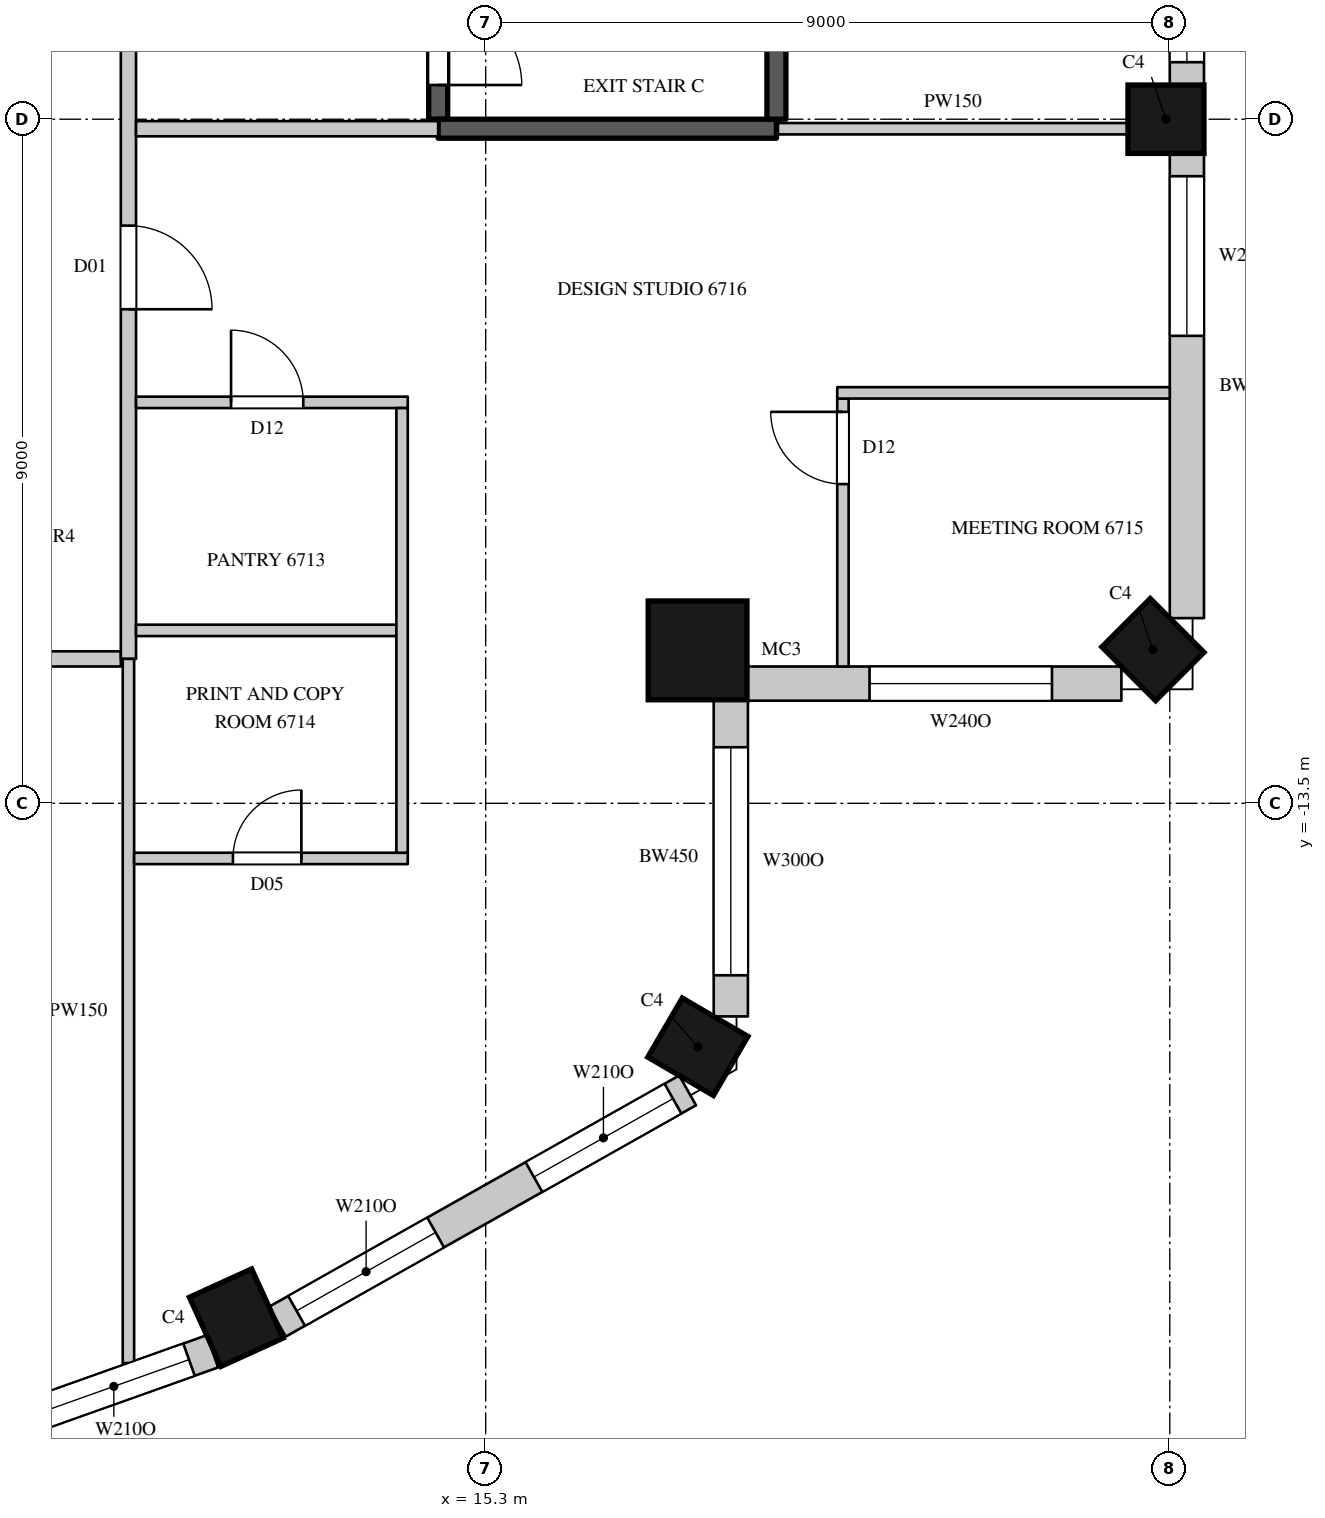
"""IFC4 building model, lengths in metres.
Left out: names, types, materials, properties, quantities, classifications, styles, units other than length and angle.
Written with IfcOpenShell. Run it as: python <this file> out.ifc"""

import sys

from ifc_helpers import new_model, si_unit, direction, frame, frame_2d, origin, origin_2d, place, context, subcontext, project, spatial, rectangle, circle, extrude, element, fill, save


model = new_model("IFC4")
c1 = context("Model", 3, precision=1e-05, world=origin(), true_north=direction((0.0, 1.0)))
c2 = subcontext(c1, "Body", "Model", "MODEL_VIEW")
j1 = project(units=[si_unit("LENGTHUNIT", "METRE"), si_unit("PLANEANGLEUNIT", "RADIAN")], contexts=[c1])
p1 = place(None, origin())
s1 = spatial("IfcSite", under=j1, at=p1, CompositionType="ELEMENT")
p2 = place(p1, origin())
s2 = spatial("IfcBuilding", under=s1, at=p2, CompositionType="ELEMENT")
p3 = place(p2, frame((0.0, 0.0, 296.7)))
s3 = spatial("IfcBuildingStorey", under=s2, at=p3, CompositionType="ELEMENT", Elevation=296.7)
for number, where, z_axis, x_axis in (
    (1, (12.019, -20.267, 0.0), (0.0, 0.0, 1.0), (0.91, 0.415, 0.0)),
    (2, (18.091, -16.703, 0.0), (0.0, 0.0, 1.0), (0.504, 0.863, 0.0)),
):
    element("IfcColumn", number, at=place(p3, frame(where, z_axis=z_axis, x_axis=x_axis)), inside=s3, PredefinedType="COLUMN", context=c2, shape_type="SweptSolid", body=[
        extrude(rectangle(XDim=0.9, YDim=1.0, at=origin_2d()), origin(), (0.0, 0.0, 1.0), 4.1),
    ])
p4 = place(p3, frame((18.088, -11.488, 0.0), z_axis=(0.0, 0.0, 1.0), x_axis=(1.0, 0.0, 0.0)))
e3 = element("IfcColumn", 3, at=p4, inside=s3, PredefinedType="COLUMN", context=c2, shape_type="SweptSolid", body=[
    extrude(circle(Radius=0.65, at=origin_2d()), origin(), (0.0, 0.0, 1.0), 4.1),
])
for number, where, z_axis, x_axis in (
    (4, (24.078, -11.478, 0.0), (0.0, 0.0, 1.0), (0.707, 0.707, 0.0)),
    (5, (24.25, -4.5, 0.0), (0.0, 0.0, 1.0), (0.0, 1.0, 0.0)),
):
    element("IfcColumn", number, at=place(p3, frame(where, z_axis=z_axis, x_axis=x_axis)), inside=s3, PredefinedType="COLUMN", context=c2, shape_type="SweptSolid", body=[
        extrude(rectangle(XDim=0.9, YDim=1.0, at=origin_2d()), origin(), (0.0, 0.0, 1.0), 4.1),
    ])
p5 = place(p3, frame((5.665, -22.859, 0.0), z_axis=(0.0, 0.0, 1.0), x_axis=(0.942108340262, 0.335308626803, 0.0)))
e6 = element("IfcWall", 6, at=p5, inside=s3, PredefinedType="SOLIDWALL", context=c2, shape_type="SweptSolid", body=[
    extrude(rectangle(XDim=6.412, YDim=0.45, at=frame_2d((3.206, 0.0))), origin(), (0.0, 0.0, 1.0), 3.8),
])
p6 = place(p5, frame((0.327, 0.0, 1.05)))
e7 = element("IfcOpeningElement", 7, at=p6, cuts=e6, PredefinedType="OPENING", context=c2, shape_type="SweptSolid", body=[
    extrude(rectangle(XDim=2.1, YDim=2.4, at=frame_2d((1.05, 1.2))), frame((0.0, 0.235, 0.0), z_axis=(0.0, -1.0, 0.0), x_axis=(1.0, 0.0, 0.0)), (0.0, 0.0, 1.0), 0.47),
])
p7 = place(p5, frame((3.985, 0.0, 1.05)))
e8 = element("IfcOpeningElement", 8, at=p7, cuts=e6, PredefinedType="OPENING", context=c2, shape_type="SweptSolid", body=[
    extrude(rectangle(XDim=2.1, YDim=2.4, at=frame_2d((1.05, 1.2))), frame((0.0, 0.235, 0.0), z_axis=(0.0, -1.0, 0.0), x_axis=(1.0, 0.0, 0.0)), (0.0, 0.0, 1.0), 0.47),
])
p8 = place(p3, frame((12.559, -20.32, 0.0), z_axis=(0.0, 0.0, 1.0), x_axis=(0.871065783524, 0.491166367714, 0.0)))
e9 = element("IfcWall", 9, at=p8, inside=s3, PredefinedType="SOLIDWALL", context=c2, shape_type="SweptSolid", body=[
    extrude(rectangle(XDim=6.196, YDim=0.45, at=frame_2d((3.098, 0.0))), origin(), (0.0, 0.0, 1.0), 3.8),
])
p9 = place(p8, frame((0.291, 0.0, 1.05)))
e10 = element("IfcOpeningElement", 10, at=p9, cuts=e9, PredefinedType="OPENING", context=c2, shape_type="SweptSolid", body=[
    extrude(rectangle(XDim=2.1, YDim=2.4, at=frame_2d((1.05, 1.2))), frame((0.0, 0.235, 0.0), z_axis=(0.0, -1.0, 0.0), x_axis=(1.0, 0.0, 0.0)), (0.0, 0.0, 1.0), 0.47),
])
p10 = place(p8, frame((3.875, 0.0, 1.05)))
e11 = element("IfcOpeningElement", 11, at=p10, cuts=e9, PredefinedType="OPENING", context=c2, shape_type="SweptSolid", body=[
    extrude(rectangle(XDim=2.1, YDim=2.4, at=frame_2d((1.05, 1.2))), frame((0.0, 0.235, 0.0), z_axis=(0.0, -1.0, 0.0), x_axis=(1.0, 0.0, 0.0)), (0.0, 0.0, 1.0), 0.47),
])
p11 = place(p3, frame((18.525, -16.304, 0.0), z_axis=(0.0, 0.0, 1.0), x_axis=(0.0, 1.0, 0.0)))
e12 = element("IfcWall", 12, at=p11, inside=s3, PredefinedType="SOLIDWALL", context=c2, shape_type="SweptSolid", body=[
    extrude(rectangle(XDim=4.202, YDim=0.45, at=frame_2d((2.101, 0.0))), origin(), (0.0, 0.0, 1.0), 3.8),
])
p12 = place(p11, frame((0.541, 0.0, 1.05)))
e13 = element("IfcOpeningElement", 13, at=p12, cuts=e12, PredefinedType="OPENING", context=c2, shape_type="SweptSolid", body=[
    extrude(rectangle(XDim=3.0, YDim=2.4, at=frame_2d((1.5, 1.2))), frame((0.0, 0.235, 0.0), z_axis=(0.0, -1.0, 0.0), x_axis=(1.0, 0.0, 0.0)), (0.0, 0.0, 1.0), 0.47),
])
p13 = place(p3, frame((18.701, -11.925, 0.0), z_axis=(0.0, 0.0, 1.0), x_axis=(1.0, 0.0, 0.0)))
e14 = element("IfcWall", 14, at=p13, inside=s3, PredefinedType="SOLIDWALL", context=c2, shape_type="SweptSolid", body=[
    extrude(rectangle(XDim=4.962, YDim=0.45, at=frame_2d((2.481, 0.0))), origin(), (0.0, 0.0, 1.0), 3.8),
])
p14 = place(p13, frame((1.648, 0.0, 1.05)))
e15 = element("IfcOpeningElement", 15, at=p14, cuts=e14, PredefinedType="OPENING", context=c2, shape_type="SweptSolid", body=[
    extrude(rectangle(XDim=2.4, YDim=2.4, at=frame_2d((1.2, 1.2))), frame((0.0, 0.235, 0.0), z_axis=(0.0, -1.0, 0.0), x_axis=(1.0, 0.0, 0.0)), (0.0, 0.0, 1.0), 0.47),
])
p15 = place(p3, frame((24.525, -11.064, 0.0), z_axis=(0.0, 0.0, 1.0), x_axis=(0.0, 1.0, 0.0)))
e16 = element("IfcWall", 16, at=p15, inside=s3, PredefinedType="SOLIDWALL", context=c2, shape_type="SweptSolid", body=[
    extrude(rectangle(XDim=6.114, YDim=0.45, at=frame_2d((3.057, 0.0))), origin(), (0.0, 0.0, 1.0), 3.8),
])
p16 = place(p15, frame((3.714, 0.0, 1.05)))
e17 = element("IfcOpeningElement", 17, at=p16, cuts=e16, PredefinedType="OPENING", context=c2, shape_type="SweptSolid", body=[
    extrude(rectangle(XDim=2.1, YDim=2.4, at=frame_2d((1.05, 1.2))), frame((0.0, 0.235, 0.0), z_axis=(0.0, -1.0, 0.0), x_axis=(1.0, 0.0, 0.0)), (0.0, 0.0, 1.0), 0.47),
])
p17 = place(p3, frame((24.525, -4.05, 0.0), z_axis=(0.0, 0.0, 1.0), x_axis=(0.0, 1.0, 0.0)))
e18 = element("IfcWall", 18, at=p17, inside=s3, PredefinedType="SOLIDWALL", context=c2, shape_type="SweptSolid", body=[
    extrude(rectangle(XDim=8.1, YDim=0.45, at=frame_2d((4.05, 0.0))), origin(), (0.0, 0.0, 1.0), 3.8),
])
p18 = place(p17, frame((0.3, 0.0, 1.05)))
e19 = element("IfcOpeningElement", 19, at=p18, cuts=e18, PredefinedType="OPENING", context=c2, shape_type="SweptSolid", body=[
    extrude(rectangle(XDim=3.0, YDim=2.4, at=frame_2d((1.5, 1.2))), frame((0.0, 0.235, 0.0), z_axis=(0.0, -1.0, 0.0), x_axis=(1.0, 0.0, 0.0)), (0.0, 0.0, 1.0), 0.47),
])
p19 = place(p17, frame((4.8, 0.0, 1.05)))
e20 = element("IfcOpeningElement", 20, at=p19, cuts=e18, PredefinedType="OPENING", context=c2, shape_type="SweptSolid", body=[
    extrude(rectangle(XDim=3.0, YDim=2.4, at=frame_2d((1.5, 1.2))), frame((0.0, 0.235, 0.0), z_axis=(0.0, -1.0, 0.0), x_axis=(1.0, 0.0, 0.0)), (0.0, 0.0, 1.0), 0.47),
])
p20 = place(p3, frame((7.021, -11.6, 0.0), z_axis=(0.0, 0.0, 1.0), x_axis=(1.0, 0.0, 0.0)))
e21 = element("IfcWall", 21, at=p20, inside=s3, PredefinedType="PARTITIONING", context=c2, shape_type="SweptSolid", body=[
    extrude(rectangle(XDim=3.479, YDim=0.2, at=frame_2d((1.74, 0.0))), origin(), (0.0, 0.0, 1.0), 3.8),
])
p21 = place(p3, frame((10.6, -11.6, 0.0), z_axis=(0.0, 0.0, 1.0), x_axis=(0.0, 1.0, 0.0)))
e22 = element("IfcWall", 22, at=p21, inside=s3, PredefinedType="PARTITIONING", context=c2, shape_type="SweptSolid", body=[
    extrude(rectangle(XDim=23.7, YDim=0.2, at=frame_2d((11.85, 0.0))), origin(), (0.0, 0.0, 1.0), 3.8),
])
p22 = place(p21, frame((9.45, 0.0, 0.0)))
e23 = element("IfcOpeningElement", 23, at=p22, cuts=e22, PredefinedType="OPENING", context=c2, shape_type="SweptSolid", body=[
    extrude(rectangle(XDim=1.5, YDim=2.4, at=frame_2d((0.75, 1.2))), frame((0.0, 0.11, 0.0), z_axis=(0.0, -1.0, 0.0), x_axis=(1.0, 0.0, 0.0)), (0.0, 0.0, 1.0), 0.22),
])
p23 = place(p21, frame((19.45, 0.0, 0.0)))
e24 = element("IfcOpeningElement", 24, at=p23, cuts=e22, PredefinedType="OPENING", context=c2, shape_type="SweptSolid", body=[
    extrude(rectangle(XDim=1.1, YDim=2.4, at=frame_2d((0.55, 1.2))), frame((0.0, 0.11, 0.0), z_axis=(0.0, -1.0, 0.0), x_axis=(1.0, 0.0, 0.0)), (0.0, 0.0, 1.0), 0.22),
])
p24 = place(p21, frame((4.6, 0.0, 0.0)))
e25 = element("IfcOpeningElement", 25, at=p24, cuts=e22, PredefinedType="OPENING", context=c2, shape_type="SweptSolid", body=[
    extrude(rectangle(XDim=1.1, YDim=2.4, at=frame_2d((0.55, 1.2))), frame((0.0, 0.11, 0.0), z_axis=(0.0, -1.0, 0.0), x_axis=(1.0, 0.0, 0.0)), (0.0, 0.0, 1.0), 0.22),
])
p25 = place(p3, frame((10.7, -4.625, 0.0), z_axis=(0.0, 0.0, 1.0), x_axis=(1.0, 0.0, 0.0)))
e26 = element("IfcWall", 26, at=p25, inside=s3, PredefinedType="PARTITIONING", context=c2, shape_type="SweptSolid", body=[
    extrude(rectangle(XDim=3.975, YDim=0.2, at=frame_2d((1.988, 0.0))), origin(), (0.0, 0.0, 1.0), 3.8),
])
p26 = place(p3, frame((10.6, -20.864, 0.0), z_axis=(0.0, 0.0, 1.0), x_axis=(0.0, 1.0, 0.0)))
e27 = element("IfcWall", 27, at=p26, inside=s3, PredefinedType="PARTITIONING", context=c2, shape_type="SweptSolid", body=[
    extrude(rectangle(XDim=9.264, YDim=0.15, at=frame_2d((4.632, 0.0))), origin(), (0.0, 0.0, 1.0), 3.8),
])
p27 = place(p3, frame((10.675, -14.225, 0.0), z_axis=(0.0, 0.0, 1.0), x_axis=(1.0, 0.0, 0.0)))
e28 = element("IfcWall", 28, at=p27, inside=s3, PredefinedType="PARTITIONING", context=c2, shape_type="SweptSolid", body=[
    extrude(rectangle(XDim=3.6, YDim=0.15, at=frame_2d((1.8, 0.0))), origin(), (0.0, 0.0, 1.0), 3.8),
])
p28 = place(p27, frame((1.3, 0.0, 0.0)))
e29 = element("IfcOpeningElement", 29, at=p28, cuts=e28, PredefinedType="OPENING", context=c2, shape_type="SweptSolid", body=[
    extrude(rectangle(XDim=0.9, YDim=2.2, at=frame_2d((0.45, 1.1))), frame((0.0, 0.085, 0.0), z_axis=(0.0, -1.0, 0.0), x_axis=(1.0, 0.0, 0.0)), (0.0, 0.0, 1.0), 0.17),
])
p29 = place(p3, frame((10.7, -11.225, 0.0), z_axis=(0.0, 0.0, 1.0), x_axis=(1.0, 0.0, 0.0)))
e30 = element("IfcWall", 30, at=p29, inside=s3, PredefinedType="PARTITIONING", context=c2, shape_type="SweptSolid", body=[
    extrude(rectangle(XDim=3.425, YDim=0.15, at=frame_2d((1.712, 0.0))), origin(), (0.0, 0.0, 1.0), 3.8),
])
p30 = place(p3, frame((10.7, -8.225, 0.0), z_axis=(0.0, 0.0, 1.0), x_axis=(1.0, 0.0, 0.0)))
e31 = element("IfcWall", 31, at=p30, inside=s3, PredefinedType="PARTITIONING", context=c2, shape_type="SweptSolid", body=[
    extrude(rectangle(XDim=3.575, YDim=0.15, at=frame_2d((1.788, 0.0))), origin(), (0.0, 0.0, 1.0), 3.15),
])
p31 = place(p30, frame((1.25, 0.0, 0.0)))
e32 = element("IfcOpeningElement", 32, at=p31, cuts=e31, PredefinedType="OPENING", context=c2, shape_type="SweptSolid", body=[
    extrude(rectangle(XDim=0.95, YDim=2.2, at=frame_2d((0.475, 1.1))), frame((0.0, 0.085, 0.0), z_axis=(0.0, -1.0, 0.0), x_axis=(1.0, 0.0, 0.0)), (0.0, 0.0, 1.0), 0.17),
])
p32 = place(p3, frame((14.2, -14.15, 0.0), z_axis=(0.0, 0.0, 1.0), x_axis=(0.0, 1.0, 0.0)))
e33 = element("IfcWall", 33, at=p32, inside=s3, PredefinedType="PARTITIONING", context=c2, shape_type="SweptSolid", body=[
    extrude(rectangle(XDim=5.85, YDim=0.15, at=frame_2d((2.925, 0.0))), origin(), (0.0, 0.0, 1.0), 3.8),
])
p33 = place(p3, frame((19.145, -4.625, 0.0), z_axis=(0.0, 0.0, 1.0), x_axis=(1.0, 0.0, 0.0)))
e34 = element("IfcWall", 34, at=p33, inside=s3, PredefinedType="PARTITIONING", context=c2, shape_type="SweptSolid", body=[
    extrude(rectangle(XDim=4.605, YDim=0.15, at=frame_2d((2.302, 0.0))), origin(), (0.0, 0.0, 1.0), 3.8),
])
p34 = place(p3, frame((20.0, -11.7, 0.0), z_axis=(0.0, 0.0, 1.0), x_axis=(0.0, 1.0, 0.0)))
e35 = element("IfcWall", 35, at=p34, inside=s3, PredefinedType="PARTITIONING", context=c2, shape_type="SweptSolid", body=[
    extrude(rectangle(XDim=3.525, YDim=0.15, at=frame_2d((1.762, 0.0))), origin(), (0.0, 0.0, 1.0), 3.8),
])
p35 = place(p34, frame((2.4, 0.0, 0.0)))
e36 = element("IfcOpeningElement", 36, at=p35, cuts=e35, PredefinedType="OPENING", context=c2, shape_type="SweptSolid", body=[
    extrude(rectangle(XDim=0.95, YDim=2.2, at=frame_2d((0.475, 1.1))), frame((0.0, 0.085, 0.0), z_axis=(0.0, -1.0, 0.0), x_axis=(1.0, 0.0, 0.0)), (0.0, 0.0, 1.0), 0.17),
])
p36 = place(p3, frame((19.925, -8.1, 0.0), z_axis=(0.0, 0.0, 1.0), x_axis=(1.0, 0.0, 0.0)))
e37 = element("IfcWall", 37, at=p36, inside=s3, PredefinedType="PARTITIONING", context=c2, shape_type="SweptSolid", body=[
    extrude(rectangle(XDim=4.375, YDim=0.15, at=frame_2d((2.188, 0.0))), origin(), (0.0, 0.0, 1.0), 3.15),
])
p37 = place(p3, frame((14.675, -4.5, 0.0), z_axis=(0.0, 0.0, 1.0), x_axis=(0.0, 1.0, 0.0)))
e38 = element("IfcWall", 38, at=p37, inside=s3, PredefinedType="SHEAR", context=c2, shape_type="SweptSolid", body=[
    extrude(rectangle(XDim=9.0, YDim=0.25, at=frame_2d((4.5, 0.0))), origin(), (0.0, 0.0, 1.0), 3.8),
])
p38 = place(p37, frame((0.45, 0.0, 0.0)))
e39 = element("IfcOpeningElement", 39, at=p38, cuts=e38, PredefinedType="OPENING", context=c2, shape_type="SweptSolid", body=[
    extrude(rectangle(XDim=1.1, YDim=2.2, at=frame_2d((0.55, 1.1))), frame((0.0, 0.135, 0.0), z_axis=(0.0, -1.0, 0.0), x_axis=(1.0, 0.0, 0.0)), (0.0, 0.0, 1.0), 0.27),
])
p39 = place(p3, frame((14.675, -4.625, 0.0), z_axis=(0.0, 0.0, 1.0), x_axis=(1.0, 0.0, 0.0)))
e40 = element("IfcWall", 40, at=p39, inside=s3, PredefinedType="SHEAR", context=c2, shape_type="SweptSolid", body=[
    extrude(rectangle(XDim=4.45, YDim=0.25, at=frame_2d((2.225, 0.0))), origin(), (0.0, 0.0, 1.0), 3.8),
])
p40 = place(p3, frame((19.125, -4.5, 0.0), z_axis=(0.0, 0.0, 1.0), x_axis=(0.0, 1.0, 0.0)))
e41 = element("IfcWall", 41, at=p40, inside=s3, PredefinedType="SHEAR", context=c2, shape_type="SweptSolid", body=[
    extrude(rectangle(XDim=9.0, YDim=0.25, at=frame_2d((4.5, 0.0))), origin(), (0.0, 0.0, 1.0), 3.8),
])
p41 = place(p7, origin())
e42 = element("IfcWindow", 42, at=p41, inside=s3, PartitioningType="SINGLE_PANEL", PredefinedType="WINDOW", context=c2, shape_type="SweptSolid", body=[
    extrude(rectangle(XDim=2.1, YDim=2.4, at=frame_2d((1.05, 1.2))), frame((0.0, 0.135, 0.0), z_axis=(0.0, -1.0, 0.0), x_axis=(1.0, 0.0, 0.0)), (0.0, 0.0, 1.0), 0.06),
])
fill(e8, e42)
p42 = place(p9, origin())
e43 = element("IfcWindow", 43, at=p42, inside=s3, PartitioningType="SINGLE_PANEL", PredefinedType="WINDOW", context=c2, shape_type="SweptSolid", body=[
    extrude(rectangle(XDim=2.1, YDim=2.4, at=frame_2d((1.05, 1.2))), frame((0.0, 0.135, 0.0), z_axis=(0.0, -1.0, 0.0), x_axis=(1.0, 0.0, 0.0)), (0.0, 0.0, 1.0), 0.06),
])
fill(e10, e43)
p43 = place(p10, origin())
e44 = element("IfcWindow", 44, at=p43, inside=s3, PartitioningType="SINGLE_PANEL", PredefinedType="WINDOW", context=c2, shape_type="SweptSolid", body=[
    extrude(rectangle(XDim=2.1, YDim=2.4, at=frame_2d((1.05, 1.2))), frame((0.0, 0.135, 0.0), z_axis=(0.0, -1.0, 0.0), x_axis=(1.0, 0.0, 0.0)), (0.0, 0.0, 1.0), 0.06),
])
fill(e11, e44)
p44 = place(p12, origin())
e45 = element("IfcWindow", 45, at=p44, inside=s3, PartitioningType="SINGLE_PANEL", PredefinedType="WINDOW", context=c2, shape_type="SweptSolid", body=[
    extrude(rectangle(XDim=3.0, YDim=2.4, at=frame_2d((1.5, 1.2))), frame((0.0, 0.135, 0.0), z_axis=(0.0, -1.0, 0.0), x_axis=(1.0, 0.0, 0.0)), (0.0, 0.0, 1.0), 0.06),
])
fill(e13, e45)
p45 = place(p16, origin())
e46 = element("IfcWindow", 46, at=p45, inside=s3, PartitioningType="SINGLE_PANEL", PredefinedType="WINDOW", context=c2, shape_type="SweptSolid", body=[
    extrude(rectangle(XDim=2.1, YDim=2.4, at=frame_2d((1.05, 1.2))), frame((0.0, 0.135, 0.0), z_axis=(0.0, -1.0, 0.0), x_axis=(1.0, 0.0, 0.0)), (0.0, 0.0, 1.0), 0.06),
])
fill(e17, e46)
p46 = place(p18, origin())
e47 = element("IfcWindow", 47, at=p46, inside=s3, PartitioningType="SINGLE_PANEL", PredefinedType="WINDOW", context=c2, shape_type="SweptSolid", body=[
    extrude(rectangle(XDim=3.0, YDim=2.4, at=frame_2d((1.5, 1.2))), frame((0.0, 0.135, 0.0), z_axis=(0.0, -1.0, 0.0), x_axis=(1.0, 0.0, 0.0)), (0.0, 0.0, 1.0), 0.06),
])
fill(e19, e47)
p47 = place(p24, origin())
e48 = element("IfcDoor", 48, at=p47, inside=s3, OperationType="SINGLE_SWING_RIGHT", PredefinedType="DOOR", context=c2, shape_type="SweptSolid", body=[
    extrude(rectangle(XDim=1.1, YDim=2.4, at=frame_2d((0.55, 1.2))), frame((0.0, 0.025, 0.0), z_axis=(0.0, -1.0, 0.0), x_axis=(1.0, 0.0, 0.0)), (0.0, 0.0, 1.0), 0.05),
])
fill(e25, e48)
p48 = place(p31, origin())
e49 = element("IfcDoor", 49, at=p48, inside=s3, OperationType="SINGLE_SWING_LEFT", PredefinedType="DOOR", context=c2, shape_type="SweptSolid", body=[
    extrude(rectangle(XDim=0.95, YDim=2.2, at=frame_2d((0.475, 1.1))), frame((0.0, 0.025, 0.0), z_axis=(0.0, -1.0, 0.0), x_axis=(1.0, 0.0, 0.0)), (0.0, 0.0, 1.0), 0.05),
])
fill(e32, e49)
p49 = place(p28, origin())
e50 = element("IfcDoor", 50, at=p49, inside=s3, OperationType="SINGLE_SWING_RIGHT", PredefinedType="DOOR", context=c2, shape_type="SweptSolid", body=[
    extrude(rectangle(XDim=0.9, YDim=2.2, at=frame_2d((0.45, 1.1))), frame((0.0, 0.025, 0.0), z_axis=(0.0, -1.0, 0.0), x_axis=(1.0, 0.0, 0.0)), (0.0, 0.0, 1.0), 0.05),
])
fill(e29, e50)
p50 = place(p35, origin())
e51 = element("IfcDoor", 51, at=p50, inside=s3, OperationType="SINGLE_SWING_RIGHT", PredefinedType="DOOR", context=c2, shape_type="SweptSolid", body=[
    extrude(rectangle(XDim=0.95, YDim=2.2, at=frame_2d((0.475, 1.1))), frame((0.0, 0.025, 0.0), z_axis=(0.0, -1.0, 0.0), x_axis=(1.0, 0.0, 0.0)), (0.0, 0.0, 1.0), 0.05),
])
fill(e36, e51)
p51 = place(p38, origin())
e52 = element("IfcDoor", 52, at=p51, inside=s3, OperationType="SINGLE_SWING_RIGHT", PredefinedType="DOOR", context=c2, shape_type="SweptSolid", body=[
    extrude(rectangle(XDim=1.1, YDim=2.2, at=frame_2d((0.55, 1.1))), frame((0.0, 0.025, 0.0), z_axis=(0.0, -1.0, 0.0), x_axis=(1.0, 0.0, 0.0)), (0.0, 0.0, 1.0), 0.05),
])
fill(e39, e52)
p52 = place(p14, origin())
e53 = element("IfcWindow", 53, at=p52, inside=s3, PartitioningType="SINGLE_PANEL", PredefinedType="WINDOW", context=c2, shape_type="SweptSolid", body=[
    extrude(rectangle(XDim=2.4, YDim=2.4, at=frame_2d((1.2, 1.2))), frame((0.0, 0.135, 0.0), z_axis=(0.0, -1.0, 0.0), x_axis=(1.0, 0.0, 0.0)), (0.0, 0.0, 1.0), 0.06),
])
fill(e15, e53)
save(model, sys.argv[1])
